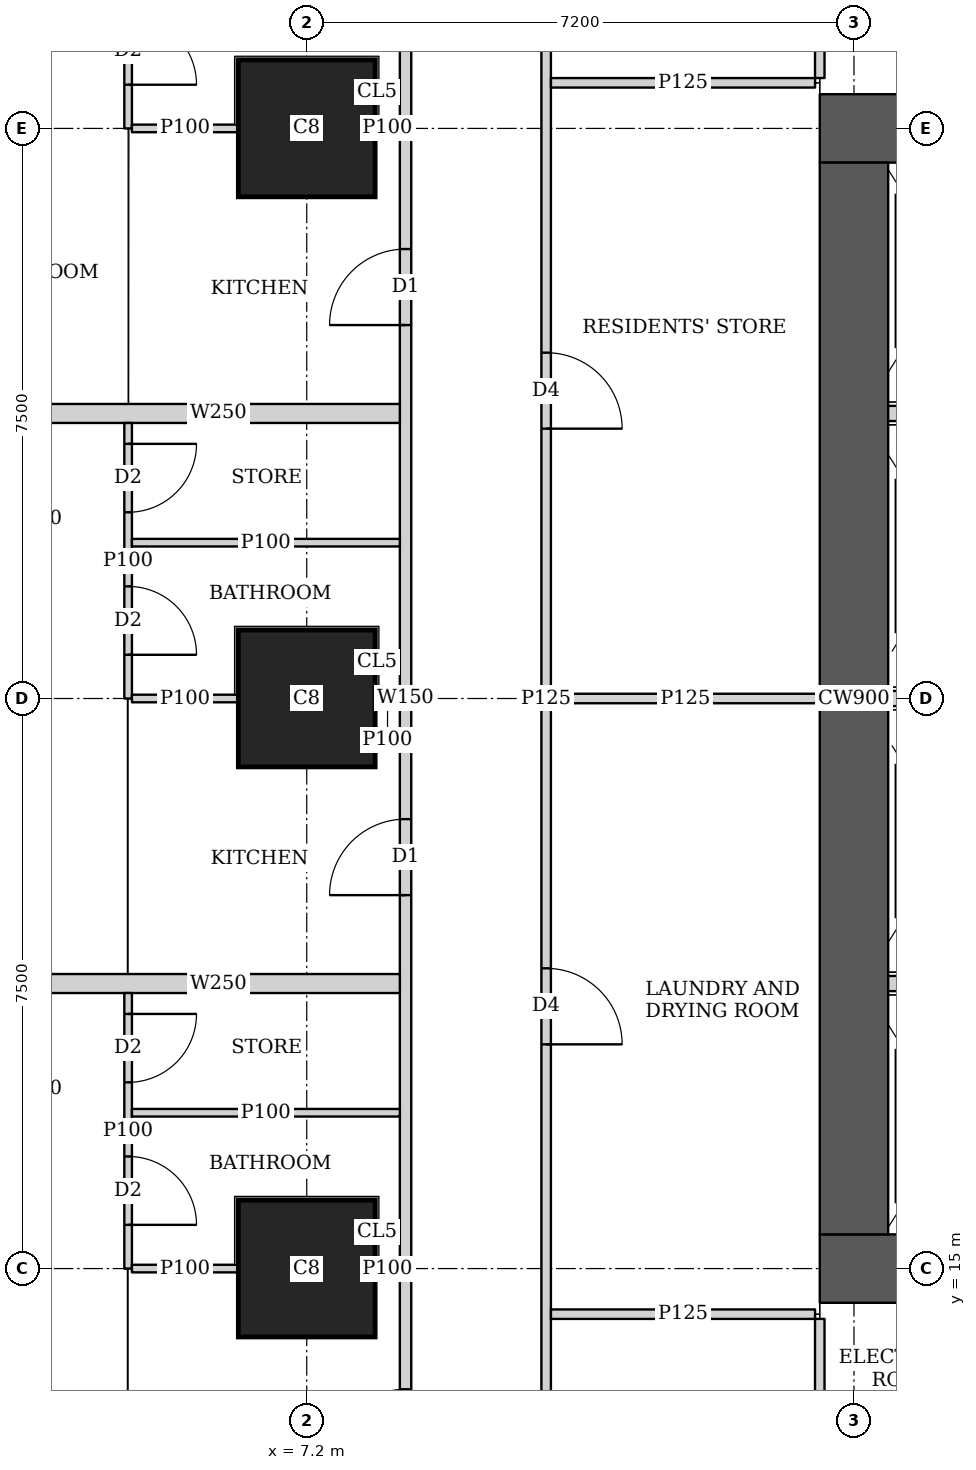
"""IFC4 building model, lengths in metres.
Left out: names, types, materials, properties, quantities, classifications, styles, units other than length and angle.
Written with IfcOpenShell. Run it as: python <this file> out.ifc"""

import sys

from ifc_helpers import new_model, si_unit, direction, frame, frame_2d, origin, origin_2d, place, context, subcontext, project, spatial, rectangle, extrude, element, fill, save


model = new_model("IFC4")
c1 = context("Model", 3, precision=1e-05, world=origin(), true_north=direction((0.0, 1.0)))
c2 = subcontext(c1, "Body", "Model", "MODEL_VIEW")
j1 = project(units=[si_unit("LENGTHUNIT", "METRE"), si_unit("PLANEANGLEUNIT", "RADIAN")], contexts=[c1])
p1 = place(None, origin())
s1 = spatial("IfcSite", under=j1, at=p1, CompositionType="ELEMENT")
p2 = place(p1, origin())
s2 = spatial("IfcBuilding", under=s1, at=p2, CompositionType="ELEMENT")
p3 = place(p2, frame((0.0, 0.0, 65.0)))
s3 = spatial("IfcBuildingStorey", under=s2, at=p3, CompositionType="ELEMENT", Elevation=65.0)
for number, where, z_axis, x_axis in (
    (1, (7.2, 15.0, 0.0), (0.0, 0.0, 1.0), (1.0, 0.0, 0.0)),
    (2, (7.2, 22.5, 0.0), (0.0, 0.0, 1.0), (1.0, 0.0, 0.0)),
    (3, (7.2, 30.0, 0.0), (0.0, 0.0, 1.0), (1.0, 0.0, 0.0)),
):
    element("IfcColumn", number, at=place(p3, frame(where, z_axis=z_axis, x_axis=x_axis)), inside=s3, PredefinedType="COLUMN", context=c2, shape_type="SweptSolid", body=[
        extrude(rectangle(XDim=1.8, YDim=1.8, at=origin_2d()), origin(), (0.0, 0.0, 1.0), 3.75),
    ])
p4 = place(p3, frame((13.95, 15.0, 0.0), z_axis=(0.0, 0.0, 1.0), x_axis=(1.0, 0.0, 0.0)))
e4 = element("IfcWall", 4, at=p4, inside=s3, PredefinedType="SHEAR", context=c2, shape_type="SweptSolid", body=[
    extrude(rectangle(XDim=15.3, YDim=0.9, at=frame_2d((7.65, 0.0))), origin(), (0.0, 0.0, 1.0), 3.75),
])
p5 = place(p4, frame((4.45, 0.0, 0.0)))
e5 = element("IfcOpeningElement", 5, at=p5, cuts=e4, PredefinedType="OPENING", context=c2, shape_type="SweptSolid", body=[
    extrude(rectangle(XDim=1.8, YDim=2.1, at=frame_2d((0.9, 1.05))), frame((0.0, 0.46, 0.0), z_axis=(0.0, -1.0, 0.0), x_axis=(1.0, 0.0, 0.0)), (0.0, 0.0, 1.0), 0.92),
])
p6 = place(p4, frame((10.7, 0.0, 0.0)))
e6 = element("IfcOpeningElement", 6, at=p6, cuts=e4, PredefinedType="OPENING", context=c2, shape_type="SweptSolid", body=[
    extrude(rectangle(XDim=1.1, YDim=2.1, at=frame_2d((0.55, 1.05))), frame((0.0, 0.46, 0.0), z_axis=(0.0, -1.0, 0.0), x_axis=(1.0, 0.0, 0.0)), (0.0, 0.0, 1.0), 0.92),
])
p7 = place(p3, frame((13.95, 30.0, 0.0), z_axis=(0.0, 0.0, 1.0), x_axis=(1.0, 0.0, 0.0)))
e7 = element("IfcWall", 7, at=p7, inside=s3, PredefinedType="SHEAR", context=c2, shape_type="SweptSolid", body=[
    extrude(rectangle(XDim=15.3, YDim=0.9, at=frame_2d((7.65, 0.0))), origin(), (0.0, 0.0, 1.0), 3.75),
])
p8 = place(p7, frame((4.45, 0.0, 0.0)))
e8 = element("IfcOpeningElement", 8, at=p8, cuts=e7, PredefinedType="OPENING", context=c2, shape_type="SweptSolid", body=[
    extrude(rectangle(XDim=1.8, YDim=2.1, at=frame_2d((0.9, 1.05))), frame((0.0, 0.46, 0.0), z_axis=(0.0, -1.0, 0.0), x_axis=(1.0, 0.0, 0.0)), (0.0, 0.0, 1.0), 0.92),
])
p9 = place(p7, frame((10.7, 0.0, 0.0)))
e9 = element("IfcOpeningElement", 9, at=p9, cuts=e7, PredefinedType="OPENING", context=c2, shape_type="SweptSolid", body=[
    extrude(rectangle(XDim=1.1, YDim=2.1, at=frame_2d((0.55, 1.05))), frame((0.0, 0.46, 0.0), z_axis=(0.0, -1.0, 0.0), x_axis=(1.0, 0.0, 0.0)), (0.0, 0.0, 1.0), 0.92),
])
p10 = place(p3, frame((14.4, 15.45, 0.0), z_axis=(0.0, 0.0, 1.0), x_axis=(0.0, 1.0, 0.0)))
e10 = element("IfcWall", 10, at=p10, inside=s3, PredefinedType="SHEAR", context=c2, shape_type="SweptSolid", body=[
    extrude(rectangle(XDim=14.1, YDim=0.9, at=frame_2d((7.05, 0.0))), origin(), (0.0, 0.0, 1.0), 3.75),
])
p11 = place(p3, frame((8.5, 2.426, 0.0), z_axis=(0.0, 0.0, 1.0), x_axis=(0.0, 1.0, 0.0)))
e11 = element("IfcWall", 11, at=p11, inside=s3, PredefinedType="SOLIDWALL", context=c2, shape_type="SweptSolid", body=[
    extrude(rectangle(XDim=40.173, YDim=0.15, at=frame_2d((20.086, 0.0))), origin(), (0.0, 0.0, 1.0), 3.5),
])
p12 = place(p11, frame((6.661, 0.0, 0.0)))
e12 = element("IfcOpeningElement", 12, at=p12, cuts=e11, PredefinedType="OPENING", context=c2, shape_type="SweptSolid", body=[
    extrude(rectangle(XDim=1.0, YDim=2.1, at=frame_2d((0.5, 1.05))), frame((0.0, 0.085, 0.0), z_axis=(0.0, -1.0, 0.0), x_axis=(1.0, 0.0, 0.0)), (0.0, 0.0, 1.0), 0.17),
])
p13 = place(p11, frame((9.986, 0.0, 0.0)))
e13 = element("IfcOpeningElement", 13, at=p13, cuts=e11, PredefinedType="OPENING", context=c2, shape_type="SweptSolid", body=[
    extrude(rectangle(XDim=1.0, YDim=2.1, at=frame_2d((0.5, 1.05))), frame((0.0, 0.085, 0.0), z_axis=(0.0, -1.0, 0.0), x_axis=(1.0, 0.0, 0.0)), (0.0, 0.0, 1.0), 0.17),
])
p14 = place(p11, frame((17.487, 0.0, 0.0)))
e14 = element("IfcOpeningElement", 14, at=p14, cuts=e11, PredefinedType="OPENING", context=c2, shape_type="SweptSolid", body=[
    extrude(rectangle(XDim=1.0, YDim=2.1, at=frame_2d((0.5, 1.05))), frame((0.0, 0.085, 0.0), z_axis=(0.0, -1.0, 0.0), x_axis=(1.0, 0.0, 0.0)), (0.0, 0.0, 1.0), 0.17),
])
p15 = place(p11, frame((24.987, 0.0, 0.0)))
e15 = element("IfcOpeningElement", 15, at=p15, cuts=e11, PredefinedType="OPENING", context=c2, shape_type="SweptSolid", body=[
    extrude(rectangle(XDim=1.0, YDim=2.1, at=frame_2d((0.5, 1.05))), frame((0.0, 0.085, 0.0), z_axis=(0.0, -1.0, 0.0), x_axis=(1.0, 0.0, 0.0)), (0.0, 0.0, 1.0), 0.17),
])
p16 = place(p3, frame((4.85, 15.0, 0.0), z_axis=(0.0, 0.0, 1.0), x_axis=(0.0, 1.0, 0.0)))
e16 = element("IfcWall", 16, at=p16, inside=s3, PredefinedType="PARTITIONING", context=c2, shape_type="SweptSolid", body=[
    extrude(rectangle(XDim=3.625, YDim=0.1, at=frame_2d((1.812, 0.0))), origin(), (0.0, 0.0, 1.0), 3.5),
])
p17 = place(p16, frame((0.575, 0.0, 0.0)))
e17 = element("IfcOpeningElement", 17, at=p17, cuts=e16, PredefinedType="OPENING", context=c2, shape_type="SweptSolid", body=[
    extrude(rectangle(XDim=0.9, YDim=2.1, at=frame_2d((0.45, 1.05))), frame((0.0, 0.06, 0.0), z_axis=(0.0, -1.0, 0.0), x_axis=(1.0, 0.0, 0.0)), (0.0, 0.0, 1.0), 0.12),
])
p18 = place(p16, frame((2.45, 0.0, 0.0)))
e18 = element("IfcOpeningElement", 18, at=p18, cuts=e16, PredefinedType="OPENING", context=c2, shape_type="SweptSolid", body=[
    extrude(rectangle(XDim=0.9, YDim=2.1, at=frame_2d((0.45, 1.05))), frame((0.0, 0.06, 0.0), z_axis=(0.0, -1.0, 0.0), x_axis=(1.0, 0.0, 0.0)), (0.0, 0.0, 1.0), 0.12),
])
p19 = place(p3, frame((4.9, 15.0, 0.0), z_axis=(0.0, 0.0, 1.0), x_axis=(1.0, 0.0, 0.0)))
e19 = element("IfcWall", 19, at=p19, inside=s3, PredefinedType="PARTITIONING", context=c2, shape_type="SweptSolid", body=[
    extrude(rectangle(XDim=1.399, YDim=0.1, at=frame_2d((0.7, 0.0))), origin(), (0.0, 0.0, 1.0), 3.5),
])
p20 = place(p3, frame((8.101, 15.0, 0.0), z_axis=(0.0, 0.0, 1.0), x_axis=(1.0, 0.0, 0.0)))
e20 = element("IfcWall", 20, at=p20, inside=s3, PredefinedType="PARTITIONING", context=c2, shape_type="SweptSolid", body=[
    extrude(rectangle(XDim=0.324, YDim=0.1, at=frame_2d((0.162, 0.0))), origin(), (0.0, 0.0, 1.0), 3.5),
])
p21 = place(p3, frame((4.9, 17.05, 0.0), z_axis=(0.0, 0.0, 1.0), x_axis=(1.0, 0.0, 0.0)))
e21 = element("IfcWall", 21, at=p21, inside=s3, PredefinedType="PARTITIONING", context=c2, shape_type="SweptSolid", body=[
    extrude(rectangle(XDim=3.525, YDim=0.1, at=frame_2d((1.763, 0.0))), origin(), (0.0, 0.0, 1.0), 3.5),
])
p22 = place(p3, frame((4.85, 22.5, 0.0), z_axis=(0.0, 0.0, 1.0), x_axis=(0.0, 1.0, 0.0)))
e22 = element("IfcWall", 22, at=p22, inside=s3, PredefinedType="PARTITIONING", context=c2, shape_type="SweptSolid", body=[
    extrude(rectangle(XDim=3.625, YDim=0.1, at=frame_2d((1.812, 0.0))), origin(), (0.0, 0.0, 1.0), 3.5),
])
p23 = place(p22, frame((0.575, 0.0, 0.0)))
e23 = element("IfcOpeningElement", 23, at=p23, cuts=e22, PredefinedType="OPENING", context=c2, shape_type="SweptSolid", body=[
    extrude(rectangle(XDim=0.9, YDim=2.1, at=frame_2d((0.45, 1.05))), frame((0.0, 0.06, 0.0), z_axis=(0.0, -1.0, 0.0), x_axis=(1.0, 0.0, 0.0)), (0.0, 0.0, 1.0), 0.12),
])
p24 = place(p22, frame((2.45, 0.0, 0.0)))
e24 = element("IfcOpeningElement", 24, at=p24, cuts=e22, PredefinedType="OPENING", context=c2, shape_type="SweptSolid", body=[
    extrude(rectangle(XDim=0.9, YDim=2.1, at=frame_2d((0.45, 1.05))), frame((0.0, 0.06, 0.0), z_axis=(0.0, -1.0, 0.0), x_axis=(1.0, 0.0, 0.0)), (0.0, 0.0, 1.0), 0.12),
])
p25 = place(p3, frame((4.9, 22.5, 0.0), z_axis=(0.0, 0.0, 1.0), x_axis=(1.0, 0.0, 0.0)))
e25 = element("IfcWall", 25, at=p25, inside=s3, PredefinedType="PARTITIONING", context=c2, shape_type="SweptSolid", body=[
    extrude(rectangle(XDim=1.399, YDim=0.1, at=frame_2d((0.7, 0.0))), origin(), (0.0, 0.0, 1.0), 3.5),
])
p26 = place(p3, frame((8.101, 22.5, 0.0), z_axis=(0.0, 0.0, 1.0), x_axis=(1.0, 0.0, 0.0)))
e26 = element("IfcWall", 26, at=p26, inside=s3, PredefinedType="PARTITIONING", context=c2, shape_type="SweptSolid", body=[
    extrude(rectangle(XDim=0.324, YDim=0.1, at=frame_2d((0.162, 0.0))), origin(), (0.0, 0.0, 1.0), 3.5),
])
p27 = place(p3, frame((4.9, 24.55, 0.0), z_axis=(0.0, 0.0, 1.0), x_axis=(1.0, 0.0, 0.0)))
e27 = element("IfcWall", 27, at=p27, inside=s3, PredefinedType="PARTITIONING", context=c2, shape_type="SweptSolid", body=[
    extrude(rectangle(XDim=3.525, YDim=0.1, at=frame_2d((1.763, 0.0))), origin(), (0.0, 0.0, 1.0), 3.5),
])
p28 = place(p3, frame((3.65, 18.75, 0.0), z_axis=(0.0, 0.0, 1.0), x_axis=(1.0, 0.0, 0.0)))
e28 = element("IfcWall", 28, at=p28, inside=s3, PredefinedType="SOLIDWALL", context=c2, shape_type="SweptSolid", body=[
    extrude(rectangle(XDim=4.775, YDim=0.25, at=frame_2d((2.388, 0.0))), origin(), (0.0, 0.0, 1.0), 3.5),
])
p29 = place(p3, frame((4.85, 30.0, 0.0), z_axis=(0.0, 0.0, 1.0), x_axis=(0.0, 1.0, 0.0)))
e29 = element("IfcWall", 29, at=p29, inside=s3, PredefinedType="PARTITIONING", context=c2, shape_type="SweptSolid", body=[
    extrude(rectangle(XDim=11.994, YDim=0.1, at=frame_2d((5.997, 0.0))), origin(), (0.0, 0.0, 1.0), 3.5),
])
p30 = place(p29, frame((0.575, 0.0, 0.0)))
e30 = element("IfcOpeningElement", 30, at=p30, cuts=e29, PredefinedType="OPENING", context=c2, shape_type="SweptSolid", body=[
    extrude(rectangle(XDim=0.9, YDim=2.1, at=frame_2d((0.45, 1.05))), frame((0.0, 0.06, 0.0), z_axis=(0.0, -1.0, 0.0), x_axis=(1.0, 0.0, 0.0)), (0.0, 0.0, 1.0), 0.12),
])
p31 = place(p29, frame((5.799, 0.0, 0.0)))
e31 = element("IfcOpeningElement", 31, at=p31, cuts=e29, PredefinedType="OPENING", context=c2, shape_type="SweptSolid", body=[
    extrude(rectangle(XDim=0.9, YDim=2.1, at=frame_2d((0.45, 1.05))), frame((0.0, 0.06, 0.0), z_axis=(0.0, -1.0, 0.0), x_axis=(1.0, 0.0, 0.0)), (0.0, 0.0, 1.0), 0.12),
])
p32 = place(p29, frame((7.9, 0.0, 0.0)))
e32 = element("IfcOpeningElement", 32, at=p32, cuts=e29, PredefinedType="OPENING", context=c2, shape_type="SweptSolid", body=[
    extrude(rectangle(XDim=0.9, YDim=2.1, at=frame_2d((0.45, 1.05))), frame((0.0, 0.06, 0.0), z_axis=(0.0, -1.0, 0.0), x_axis=(1.0, 0.0, 0.0)), (0.0, 0.0, 1.0), 0.12),
])
p33 = place(p29, frame((3.075, 0.0, 0.0)))
e33 = element("IfcOpeningElement", 33, at=p33, cuts=e29, PredefinedType="OPENING", context=c2, shape_type="SweptSolid", body=[
    extrude(rectangle(XDim=0.9, YDim=2.1, at=frame_2d((0.45, 1.05))), frame((0.0, 0.06, 0.0), z_axis=(0.0, -1.0, 0.0), x_axis=(1.0, 0.0, 0.0)), (0.0, 0.0, 1.0), 0.12),
])
p34 = place(p29, frame((10.3, 0.0, 0.0)))
e34 = element("IfcOpeningElement", 34, at=p34, cuts=e29, PredefinedType="OPENING", context=c2, shape_type="SweptSolid", body=[
    extrude(rectangle(XDim=0.9, YDim=2.1, at=frame_2d((0.45, 1.05))), frame((0.0, 0.06, 0.0), z_axis=(0.0, -1.0, 0.0), x_axis=(1.0, 0.0, 0.0)), (0.0, 0.0, 1.0), 0.12),
])
p35 = place(p3, frame((4.9, 30.0, 0.0), z_axis=(0.0, 0.0, 1.0), x_axis=(1.0, 0.0, 0.0)))
e35 = element("IfcWall", 35, at=p35, inside=s3, PredefinedType="PARTITIONING", context=c2, shape_type="SweptSolid", body=[
    extrude(rectangle(XDim=1.399, YDim=0.1, at=frame_2d((0.7, 0.0))), origin(), (0.0, 0.0, 1.0), 3.5),
])
p36 = place(p3, frame((8.101, 30.0, 0.0), z_axis=(0.0, 0.0, 1.0), x_axis=(1.0, 0.0, 0.0)))
e36 = element("IfcWall", 36, at=p36, inside=s3, PredefinedType="PARTITIONING", context=c2, shape_type="SweptSolid", body=[
    extrude(rectangle(XDim=0.324, YDim=0.1, at=frame_2d((0.162, 0.0))), origin(), (0.0, 0.0, 1.0), 3.5),
])
p37 = place(p3, frame((3.65, 26.25, 0.0), z_axis=(0.0, 0.0, 1.0), x_axis=(1.0, 0.0, 0.0)))
e37 = element("IfcWall", 37, at=p37, inside=s3, PredefinedType="SOLIDWALL", context=c2, shape_type="SweptSolid", body=[
    extrude(rectangle(XDim=4.775, YDim=0.25, at=frame_2d((2.388, 0.0))), origin(), (0.0, 0.0, 1.0), 3.5),
])
p38 = place(p3, frame((10.35, 10.3, 0.0), z_axis=(0.0, 0.0, 1.0), x_axis=(0.0, 1.0, 0.0)))
e38 = element("IfcWall", 38, at=p38, inside=s3, PredefinedType="PARTITIONING", context=c2, shape_type="SweptSolid", body=[
    extrude(rectangle(XDim=24.4, YDim=0.125, at=frame_2d((12.2, 0.0))), origin(), (0.0, 0.0, 1.0), 3.5),
])
p39 = place(p38, frame((1.55, 0.0, 0.0)))
e39 = element("IfcOpeningElement", 39, at=p39, cuts=e38, PredefinedType="OPENING", context=c2, shape_type="SweptSolid", body=[
    extrude(rectangle(XDim=1.0, YDim=2.1, at=frame_2d((0.5, 1.05))), frame((0.0, 0.073, 0.0), z_axis=(0.0, -1.0, 0.0), x_axis=(1.0, 0.0, 0.0)), (0.0, 0.0, 1.0), 0.145),
])
p40 = place(p38, frame((7.65, 0.0, 0.0)))
e40 = element("IfcOpeningElement", 40, at=p40, cuts=e38, PredefinedType="OPENING", context=c2, shape_type="SweptSolid", body=[
    extrude(rectangle(XDim=1.0, YDim=2.1, at=frame_2d((0.5, 1.05))), frame((0.0, 0.073, 0.0), z_axis=(0.0, -1.0, 0.0), x_axis=(1.0, 0.0, 0.0)), (0.0, 0.0, 1.0), 0.145),
])
p41 = place(p38, frame((15.75, 0.0, 0.0)))
e41 = element("IfcOpeningElement", 41, at=p41, cuts=e38, PredefinedType="OPENING", context=c2, shape_type="SweptSolid", body=[
    extrude(rectangle(XDim=1.0, YDim=2.1, at=frame_2d((0.5, 1.05))), frame((0.0, 0.073, 0.0), z_axis=(0.0, -1.0, 0.0), x_axis=(1.0, 0.0, 0.0)), (0.0, 0.0, 1.0), 0.145),
])
p42 = place(p38, frame((21.85, 0.0, 0.0)))
e42 = element("IfcOpeningElement", 42, at=p42, cuts=e38, PredefinedType="OPENING", context=c2, shape_type="SweptSolid", body=[
    extrude(rectangle(XDim=1.0, YDim=2.1, at=frame_2d((0.5, 1.05))), frame((0.0, 0.073, 0.0), z_axis=(0.0, -1.0, 0.0), x_axis=(1.0, 0.0, 0.0)), (0.0, 0.0, 1.0), 0.145),
])
p43 = place(p3, frame((10.413, 14.4, 0.0), z_axis=(0.0, 0.0, 1.0), x_axis=(1.0, 0.0, 0.0)))
e43 = element("IfcWall", 43, at=p43, inside=s3, PredefinedType="PARTITIONING", context=c2, shape_type="SweptSolid", body=[
    extrude(rectangle(XDim=3.475, YDim=0.125, at=frame_2d((1.737, 0.0))), origin(), (0.0, 0.0, 1.0), 3.5),
])
p44 = place(p3, frame((10.413, 22.5, 0.0), z_axis=(0.0, 0.0, 1.0), x_axis=(1.0, 0.0, 0.0)))
e44 = element("IfcWall", 44, at=p44, inside=s3, PredefinedType="PARTITIONING", context=c2, shape_type="SweptSolid", body=[
    extrude(rectangle(XDim=3.537, YDim=0.125, at=frame_2d((1.769, 0.0))), origin(), (0.0, 0.0, 1.0), 3.5),
])
p45 = place(p3, frame((10.413, 30.6, 0.0), z_axis=(0.0, 0.0, 1.0), x_axis=(1.0, 0.0, 0.0)))
e45 = element("IfcWall", 45, at=p45, inside=s3, PredefinedType="PARTITIONING", context=c2, shape_type="SweptSolid", body=[
    extrude(rectangle(XDim=3.475, YDim=0.125, at=frame_2d((1.737, 0.0))), origin(), (0.0, 0.0, 1.0), 3.5),
])
p46 = place(p3, frame((13.95, 10.413, 0.0), z_axis=(0.0, 0.0, 1.0), x_axis=(0.0, 1.0, 0.0)))
e46 = element("IfcWall", 46, at=p46, inside=s3, PredefinedType="PARTITIONING", context=c2, shape_type="SweptSolid", body=[
    extrude(rectangle(XDim=3.925, YDim=0.125, at=frame_2d((1.962, 0.0))), origin(), (0.0, 0.0, 1.0), 3.5),
])
p47 = place(p3, frame((13.95, 30.663, 0.0), z_axis=(0.0, 0.0, 1.0), x_axis=(0.0, 1.0, 0.0)))
e47 = element("IfcWall", 47, at=p47, inside=s3, PredefinedType="PARTITIONING", context=c2, shape_type="SweptSolid", body=[
    extrude(rectangle(XDim=3.924, YDim=0.125, at=frame_2d((1.962, 0.0))), origin(), (0.0, 0.0, 1.0), 3.5),
])
for number, where, z_axis, x_axis in (
    (48, (14.85, 18.75, 0.0), (0.0, 0.0, 1.0), (1.0, 0.0, 0.0)),
    (49, (14.85, 22.5, 0.0), (0.0, 0.0, 1.0), (1.0, 0.0, 0.0)),
    (50, (14.85, 26.25, 0.0), (0.0, 0.0, 1.0), (1.0, 0.0, 0.0)),
):
    element("IfcWall", number, at=place(p3, frame(where, z_axis=z_axis, x_axis=x_axis)), inside=s3, PredefinedType="SOLIDWALL", context=c2, shape_type="SweptSolid", body=[
        extrude(rectangle(XDim=1.95, YDim=0.2, at=frame_2d((0.975, 0.0))), origin(), (0.0, 0.0, 1.0), 3.5),
    ])
p48 = place(p17, origin())
e51 = element("IfcDoor", 51, at=p48, inside=s3, OperationType="SINGLE_SWING_RIGHT", PredefinedType="DOOR", context=c2, shape_type="SweptSolid", body=[
    extrude(rectangle(XDim=0.9, YDim=2.1, at=frame_2d((0.45, 1.05))), frame((0.0, 0.025, 0.0), z_axis=(0.0, -1.0, 0.0), x_axis=(1.0, 0.0, 0.0)), (0.0, 0.0, 1.0), 0.05),
])
fill(e17, e51)
p49 = place(p18, origin())
e52 = element("IfcDoor", 52, at=p49, inside=s3, OperationType="SINGLE_SWING_LEFT", PredefinedType="DOOR", context=c2, shape_type="SweptSolid", body=[
    extrude(rectangle(XDim=0.9, YDim=2.1, at=frame_2d((0.45, 1.05))), frame((0.0, 0.025, 0.0), z_axis=(0.0, -1.0, 0.0), x_axis=(1.0, 0.0, 0.0)), (0.0, 0.0, 1.0), 0.05),
])
fill(e18, e52)
p50 = place(p13, origin())
e53 = element("IfcDoor", 53, at=p50, inside=s3, OperationType="SINGLE_SWING_LEFT", PredefinedType="DOOR", context=c2, shape_type="SweptSolid", body=[
    extrude(rectangle(XDim=1.0, YDim=2.1, at=frame_2d((0.5, 1.05))), frame((0.0, 0.025, 0.0), z_axis=(0.0, -1.0, 0.0), x_axis=(1.0, 0.0, 0.0)), (0.0, 0.0, 1.0), 0.05),
])
fill(e13, e53)
p51 = place(p23, origin())
e54 = element("IfcDoor", 54, at=p51, inside=s3, OperationType="SINGLE_SWING_RIGHT", PredefinedType="DOOR", context=c2, shape_type="SweptSolid", body=[
    extrude(rectangle(XDim=0.9, YDim=2.1, at=frame_2d((0.45, 1.05))), frame((0.0, 0.025, 0.0), z_axis=(0.0, -1.0, 0.0), x_axis=(1.0, 0.0, 0.0)), (0.0, 0.0, 1.0), 0.05),
])
fill(e23, e54)
p52 = place(p24, origin())
e55 = element("IfcDoor", 55, at=p52, inside=s3, OperationType="SINGLE_SWING_LEFT", PredefinedType="DOOR", context=c2, shape_type="SweptSolid", body=[
    extrude(rectangle(XDim=0.9, YDim=2.1, at=frame_2d((0.45, 1.05))), frame((0.0, 0.025, 0.0), z_axis=(0.0, -1.0, 0.0), x_axis=(1.0, 0.0, 0.0)), (0.0, 0.0, 1.0), 0.05),
])
fill(e24, e55)
p53 = place(p14, origin())
e56 = element("IfcDoor", 56, at=p53, inside=s3, OperationType="SINGLE_SWING_LEFT", PredefinedType="DOOR", context=c2, shape_type="SweptSolid", body=[
    extrude(rectangle(XDim=1.0, YDim=2.1, at=frame_2d((0.5, 1.05))), frame((0.0, 0.025, 0.0), z_axis=(0.0, -1.0, 0.0), x_axis=(1.0, 0.0, 0.0)), (0.0, 0.0, 1.0), 0.05),
])
fill(e14, e56)
p54 = place(p30, origin())
e57 = element("IfcDoor", 57, at=p54, inside=s3, OperationType="SINGLE_SWING_RIGHT", PredefinedType="DOOR", context=c2, shape_type="SweptSolid", body=[
    extrude(rectangle(XDim=0.9, YDim=2.1, at=frame_2d((0.45, 1.05))), frame((0.0, 0.025, 0.0), z_axis=(0.0, -1.0, 0.0), x_axis=(1.0, 0.0, 0.0)), (0.0, 0.0, 1.0), 0.05),
])
fill(e30, e57)
p55 = place(p15, origin())
e58 = element("IfcDoor", 58, at=p55, inside=s3, OperationType="SINGLE_SWING_LEFT", PredefinedType="DOOR", context=c2, shape_type="SweptSolid", body=[
    extrude(rectangle(XDim=1.0, YDim=2.1, at=frame_2d((0.5, 1.05))), frame((0.0, 0.025, 0.0), z_axis=(0.0, -1.0, 0.0), x_axis=(1.0, 0.0, 0.0)), (0.0, 0.0, 1.0), 0.05),
])
fill(e15, e58)
p56 = place(p40, origin())
e59 = element("IfcDoor", 59, at=p56, inside=s3, OperationType="SINGLE_SWING_RIGHT", PredefinedType="DOOR", context=c2, shape_type="SweptSolid", body=[
    extrude(rectangle(XDim=1.0, YDim=2.1, at=frame_2d((0.5, 1.05))), frame((0.0, 0.025, 0.0), z_axis=(0.0, -1.0, 0.0), x_axis=(1.0, 0.0, 0.0)), (0.0, 0.0, 1.0), 0.05),
])
fill(e40, e59)
p57 = place(p41, origin())
e60 = element("IfcDoor", 60, at=p57, inside=s3, OperationType="SINGLE_SWING_RIGHT", PredefinedType="DOOR", context=c2, shape_type="SweptSolid", body=[
    extrude(rectangle(XDim=1.0, YDim=2.1, at=frame_2d((0.5, 1.05))), frame((0.0, 0.025, 0.0), z_axis=(0.0, -1.0, 0.0), x_axis=(1.0, 0.0, 0.0)), (0.0, 0.0, 1.0), 0.05),
])
fill(e41, e60)
save(model, sys.argv[1])
